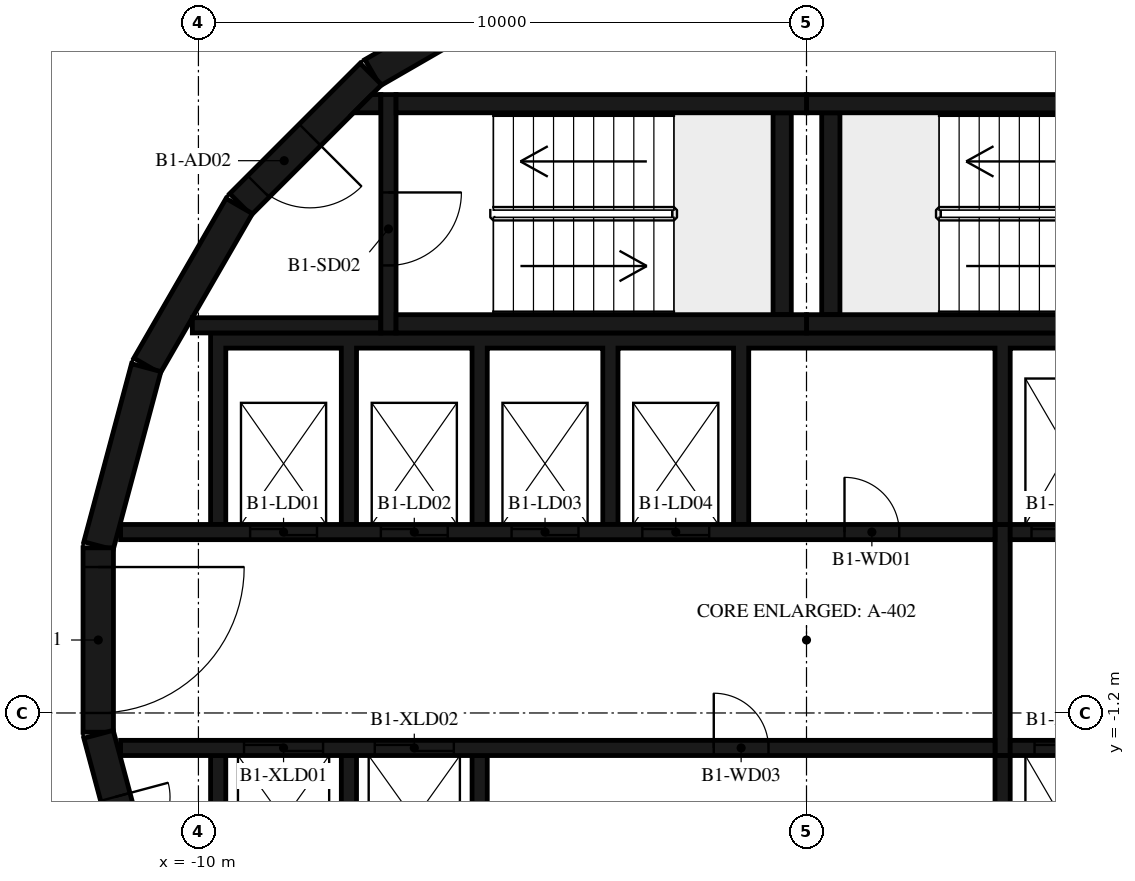
"""IFC4 building model, lengths in metres.
Left out: names, types, materials, properties, quantities, classifications, styles, units other than length and angle.
Written with IfcOpenShell. Run it as: python <this file> out.ifc"""

import sys

from ifc_helpers import new_model, si_unit, direction, frame, frame_2d, origin, place, context, subcontext, project, spatial, polyline, rectangle, outline, extrude, element, fill, save


model = new_model("IFC4")
c1 = context("Model", 3, precision=1e-05, world=origin(), true_north=direction((0.0, 1.0)))
c2 = subcontext(c1, "Body", "Model", "MODEL_VIEW")
j1 = project(units=[si_unit("LENGTHUNIT", "METRE"), si_unit("PLANEANGLEUNIT", "RADIAN")], contexts=[c1])
p1 = place(None, origin())
s1 = spatial("IfcSite", under=j1, at=p1, CompositionType="ELEMENT")
p2 = place(p1, origin())
s2 = spatial("IfcBuilding", under=s1, at=p2, CompositionType="ELEMENT")
p3 = place(p2, frame((0.0, 0.0, -4.2)))
s3 = spatial("IfcBuildingStorey", under=s2, at=p3, CompositionType="ELEMENT", Elevation=-4.2)
p4 = place(p3, frame((-4.51, 10.845, 0.0), z_axis=(0.0, 0.0, 1.0), x_axis=(-0.865975092491, -0.500087131594, 0.0)))
e1 = element("IfcWall", 1, at=p4, inside=s3, PredefinedType="SHEAR", context=c2, shape_type="SweptSolid", body=[
    extrude(rectangle(XDim=3.033, YDim=0.5, at=frame_2d((1.516, 0.0))), origin(), (0.0, 0.0, 1.0), 3.78),
])
p5 = place(p3, frame((-7.164, 9.308, 0.0), z_axis=(0.0, 0.0, 1.0), x_axis=(-0.707106781187, -0.707106781187, 0.0)))
e2 = element("IfcWall", 2, at=p5, inside=s3, PredefinedType="SHEAR", context=c2, shape_type="SweptSolid", body=[
    extrude(rectangle(XDim=3.032, YDim=0.5, at=frame_2d((1.516, 0.0))), origin(), (0.0, 0.0, 1.0), 3.78),
])
p6 = place(p5, frame((1.416, 0.0, 0.0)))
e3 = element("IfcOpeningElement", 3, at=p6, cuts=e2, PredefinedType="OPENING", context=c2, shape_type="SweptSolid", body=[
    extrude(rectangle(XDim=1.2, YDim=2.1, at=frame_2d((0.6, 1.05))), frame((0.0, 0.26, 0.0), z_axis=(0.0, -1.0, 0.0), x_axis=(1.0, 0.0, 0.0)), (0.0, 0.0, 1.0), 0.52),
])
for number, where, z_axis, x_axis in (
    (4, (-9.329, 7.137, 0.0), (0.0, 0.0, 1.0), (-0.5, -0.866, 0.0)),
    (5, (-10.858, 4.479, 0.0), (0.0, 0.0, 1.0), (-0.259, -0.966, 0.0)),
):
    element("IfcWall", number, at=place(p3, frame(where, z_axis=z_axis, x_axis=x_axis)), inside=s3, PredefinedType="SHEAR", context=c2, shape_type="SweptSolid", body=[
        extrude(rectangle(XDim=3.033, YDim=0.5, at=frame_2d((1.516, 0.0))), origin(), (0.0, 0.0, 1.0), 3.78),
    ])
p7 = place(p3, frame((-11.647, 1.516, 0.0), z_axis=(0.0, 0.0, 1.0), x_axis=(0.0, -1.0, 0.0)))
e6 = element("IfcWall", 6, at=p7, inside=s3, PredefinedType="SHEAR", context=c2, shape_type="SweptSolid", body=[
    extrude(rectangle(XDim=3.033, YDim=0.5, at=frame_2d((1.516, 0.0))), origin(), (0.0, 0.0, 1.0), 3.78),
])
p8 = place(p7, frame((0.316, 0.0, 0.0)))
e7 = element("IfcOpeningElement", 7, at=p8, cuts=e6, PredefinedType="OPENING", context=c2, shape_type="SweptSolid", body=[
    extrude(rectangle(XDim=2.4, YDim=2.1, at=frame_2d((1.2, 1.05))), frame((0.0, 0.26, 0.0), z_axis=(0.0, -1.0, 0.0), x_axis=(1.0, 0.0, 0.0)), (0.0, 0.0, 1.0), 0.52),
])
p9 = place(p3, frame((-11.643, -1.55, 0.0), z_axis=(0.0, 0.0, 1.0), x_axis=(0.258734743916, -0.965948410781, 0.0)))
e8 = element("IfcWall", 8, at=p9, inside=s3, PredefinedType="SHEAR", context=c2, shape_type="SweptSolid", body=[
    extrude(rectangle(XDim=3.033, YDim=0.5, at=frame_2d((1.516, 0.0))), origin(), (0.0, 0.0, 1.0), 3.78),
])
p10 = place(p9, frame((1.066, 0.0, 0.0)))
e9 = element("IfcOpeningElement", 9, at=p10, cuts=e8, PredefinedType="OPENING", context=c2, shape_type="SweptSolid", body=[
    extrude(rectangle(XDim=0.9, YDim=2.1, at=frame_2d((0.45, 1.05))), frame((0.0, 0.26, 0.0), z_axis=(0.0, -1.0, 0.0), x_axis=(1.0, 0.0, 0.0)), (0.0, 0.0, 1.0), 0.52),
])
for number, where, z_axis, x_axis in (
    (10, (0.0, 5.2, 0.0), (0.0, 0.0, 1.0), (1.0, 0.0, 0.0)),
    (11, (0.0, 8.82, 0.0), (0.0, 0.0, 1.0), (1.0, 0.0, 0.0)),
):
    element("IfcWall", number, at=place(p3, frame(where, z_axis=z_axis, x_axis=x_axis)), inside=s3, PredefinedType="SHEAR", context=c2, shape_type="SweptSolid", body=[
        extrude(rectangle(XDim=6.75, YDim=0.3, at=frame_2d((3.375, 0.0))), origin(), (0.0, 0.0, 1.0), 3.78),
    ])
p11 = place(p3, frame((0.4, 5.35, 0.0), z_axis=(0.0, 0.0, 1.0), x_axis=(0.0, 1.0, 0.0)))
e12 = element("IfcWall", 12, at=p11, inside=s3, PredefinedType="SHEAR", context=c2, shape_type="SweptSolid", body=[
    extrude(rectangle(XDim=3.32, YDim=0.3, at=frame_2d((1.66, 0.0))), origin(), (0.0, 0.0, 1.0), 3.78),
])
for number, where, z_axis, x_axis in (
    (13, (-6.75, 5.2, 0.0), (0.0, 0.0, 1.0), (1.0, 0.0, 0.0)),
    (14, (-6.75, 8.82, 0.0), (0.0, 0.0, 1.0), (1.0, 0.0, 0.0)),
):
    element("IfcWall", number, at=place(p3, frame(where, z_axis=z_axis, x_axis=x_axis)), inside=s3, PredefinedType="SHEAR", context=c2, shape_type="SweptSolid", body=[
        extrude(rectangle(XDim=6.75, YDim=0.3, at=frame_2d((3.375, 0.0))), origin(), (0.0, 0.0, 1.0), 3.78),
    ])
p12 = place(p3, frame((-0.4, 5.35, 0.0), z_axis=(0.0, 0.0, 1.0), x_axis=(0.0, 1.0, 0.0)))
e15 = element("IfcWall", 15, at=p12, inside=s3, PredefinedType="SHEAR", context=c2, shape_type="SweptSolid", body=[
    extrude(rectangle(XDim=3.32, YDim=0.3, at=frame_2d((1.66, 0.0))), origin(), (0.0, 0.0, 1.0), 3.78),
])
p13 = place(p3, frame((-6.875, 8.97, 0.0), z_axis=(0.0, 0.0, 1.0), x_axis=(0.0, -1.0, 0.0)))
e16 = element("IfcWall", 16, at=p13, inside=s3, PredefinedType="SHEAR", context=c2, shape_type="SweptSolid", body=[
    extrude(rectangle(XDim=3.92, YDim=0.25, at=frame_2d((1.96, 0.0))), origin(), (0.0, 0.0, 1.0), 3.78),
])
p14 = place(p13, frame((1.61, 0.0, 0.0)))
e17 = element("IfcOpeningElement", 17, at=p14, cuts=e16, PredefinedType="OPENING", context=c2, shape_type="SweptSolid", body=[
    extrude(rectangle(XDim=1.2, YDim=2.1, at=frame_2d((0.6, 1.05))), frame((0.0, 0.135, 0.0), z_axis=(0.0, -1.0, 0.0), x_axis=(1.0, 0.0, 0.0)), (0.0, 0.0, 1.0), 0.27),
])
p15 = place(p3, frame((-7.0, 5.175, 0.0), z_axis=(0.0, 0.0, 1.0), x_axis=(-1.0, 0.0, 0.0)))
e18 = element("IfcWall", 18, at=p15, inside=s3, PredefinedType="SHEAR", context=c2, shape_type="SweptSolid", body=[
    extrude(rectangle(XDim=3.1, YDim=0.25, at=frame_2d((1.55, 0.0))), origin(), (0.0, 0.0, 1.0), 3.78),
])
p16 = place(p3, origin())
e19 = element("IfcWall", 19, at=p16, inside=s3, PredefinedType="SHEAR", context=c2, shape_type="SweptSolid", body=[
    extrude(outline(polyline([(-7.148, 8.97), (-7.0, 8.97), (-7.0, 8.67), (-7.448, 8.67), (-7.148, 8.97)])), origin(), (0.0, 0.0, 1.0), 3.78),
])
p17 = place(p3, origin())
e20 = element("IfcWall", 20, at=p17, inside=s3, PredefinedType="SHEAR", context=c2, shape_type="SweptSolid", body=[
    extrude(outline(polyline([(-9.55, 4.8), (-7.65, 4.8), (-7.65, 1.9), (-7.4, 1.9), (-7.4, 4.8), (-5.5, 4.8), (-5.5, 1.9), (-5.25, 1.9), (-5.25, 4.8), (-3.35, 4.8), (-3.35, 1.9), (-3.1, 1.9), (-3.1, 4.8), (-1.2, 4.8), (-1.2, 1.9), (-0.95, 1.9), (-0.95, 4.8), (3.1, 4.8), (3.1, 1.9), (3.35, 1.9), (3.35, 4.8), (5.25, 4.8), (5.25, 1.9), (5.5, 1.9), (5.5, 4.8), (7.4, 4.8), (7.4, 1.9), (7.65, 1.9), (7.65, 4.8), (9.55, 4.8), (9.55, 1.9), (9.8, 1.9), (9.8, 4.8), (9.8, 5.05), (-9.8, 5.05), (-9.8, 4.8), (-9.8, 1.9), (-9.55, 1.9), (-9.55, 4.8)])), origin(), (0.0, 0.0, 1.0), 3.78),
])
p18 = place(p3, origin())
e21 = element("IfcWall", 21, at=p18, inside=s3, PredefinedType="SHEAR", context=c2, shape_type="SweptSolid", body=[
    extrude(outline(polyline([(9.8, -5.05), (9.8, -4.8), (9.8, -1.9), (9.55, -1.9), (9.55, -4.8), (7.65, -4.8), (7.65, -1.9), (7.4, -1.9), (7.4, -4.8), (5.5, -4.8), (5.5, -1.9), (5.25, -1.9), (5.25, -4.8), (3.35, -4.8), (3.35, -1.9), (3.1, -1.9), (3.1, -4.8), (-5.25, -4.8), (-5.25, -1.9), (-5.5, -1.9), (-5.5, -4.8), (-7.4, -4.8), (-7.4, -1.9), (-7.65, -1.9), (-7.65, -4.8), (-9.55, -4.8), (-9.55, -1.9), (-9.8, -1.9), (-9.8, -4.8), (-9.8, -5.05), (9.8, -5.05)])), origin(), (0.0, 0.0, 1.0), 3.78),
])
p19 = place(p3, frame((-11.28, 1.775, 0.0), z_axis=(0.0, 0.0, 1.0), x_axis=(1.0, 0.0, 0.0)))
e22 = element("IfcWall", 22, at=p19, inside=s3, PredefinedType="SHEAR", context=c2, shape_type="SweptSolid", body=[
    extrude(rectangle(XDim=14.38, YDim=0.25, at=frame_2d((7.19, 0.0))), origin(), (0.0, 0.0, 1.0), 3.78),
])
p20 = place(p19, frame((2.13, 0.0, 0.0)))
e23 = element("IfcOpeningElement", 23, at=p20, cuts=e22, PredefinedType="OPENING", context=c2, shape_type="SweptSolid", body=[
    extrude(rectangle(XDim=1.1, YDim=2.1, at=frame_2d((0.55, 1.05))), frame((0.0, 0.135, 0.0), z_axis=(0.0, -1.0, 0.0), x_axis=(1.0, 0.0, 0.0)), (0.0, 0.0, 1.0), 0.27),
])
p21 = place(p19, frame((4.28, 0.0, 0.0)))
e24 = element("IfcOpeningElement", 24, at=p21, cuts=e22, PredefinedType="OPENING", context=c2, shape_type="SweptSolid", body=[
    extrude(rectangle(XDim=1.1, YDim=2.1, at=frame_2d((0.55, 1.05))), frame((0.0, 0.135, 0.0), z_axis=(0.0, -1.0, 0.0), x_axis=(1.0, 0.0, 0.0)), (0.0, 0.0, 1.0), 0.27),
])
p22 = place(p19, frame((6.43, 0.0, 0.0)))
e25 = element("IfcOpeningElement", 25, at=p22, cuts=e22, PredefinedType="OPENING", context=c2, shape_type="SweptSolid", body=[
    extrude(rectangle(XDim=1.1, YDim=2.1, at=frame_2d((0.55, 1.05))), frame((0.0, 0.135, 0.0), z_axis=(0.0, -1.0, 0.0), x_axis=(1.0, 0.0, 0.0)), (0.0, 0.0, 1.0), 0.27),
])
p23 = place(p19, frame((8.58, 0.0, 0.0)))
e26 = element("IfcOpeningElement", 26, at=p23, cuts=e22, PredefinedType="OPENING", context=c2, shape_type="SweptSolid", body=[
    extrude(rectangle(XDim=1.1, YDim=2.1, at=frame_2d((0.55, 1.05))), frame((0.0, 0.135, 0.0), z_axis=(0.0, -1.0, 0.0), x_axis=(1.0, 0.0, 0.0)), (0.0, 0.0, 1.0), 0.27),
])
p24 = place(p19, frame((11.905, 0.0, 0.0)))
e27 = element("IfcOpeningElement", 27, at=p24, cuts=e22, PredefinedType="OPENING", context=c2, shape_type="SweptSolid", body=[
    extrude(rectangle(XDim=0.9, YDim=2.1, at=frame_2d((0.45, 1.05))), frame((0.0, 0.135, 0.0), z_axis=(0.0, -1.0, 0.0), x_axis=(1.0, 0.0, 0.0)), (0.0, 0.0, 1.0), 0.27),
])
p25 = place(p3, frame((3.35, 1.775, 0.0), z_axis=(0.0, 0.0, 1.0), x_axis=(1.0, 0.0, 0.0)))
e28 = element("IfcWall", 28, at=p25, inside=s3, PredefinedType="SHEAR", context=c2, shape_type="SweptSolid", body=[
    extrude(rectangle(XDim=7.93, YDim=0.25, at=frame_2d((3.965, 0.0))), origin(), (0.0, 0.0, 1.0), 3.78),
])
p26 = place(p25, frame((0.35, 0.0, 0.0)))
e29 = element("IfcOpeningElement", 29, at=p26, cuts=e28, PredefinedType="OPENING", context=c2, shape_type="SweptSolid", body=[
    extrude(rectangle(XDim=1.2, YDim=2.4, at=frame_2d((0.6, 1.2))), frame((0.0, 0.135, 0.0), z_axis=(0.0, -1.0, 0.0), x_axis=(1.0, 0.0, 0.0)), (0.0, 0.0, 1.0), 0.27),
])
p27 = place(p25, frame((2.5, 0.0, 0.0)))
e30 = element("IfcOpeningElement", 30, at=p27, cuts=e28, PredefinedType="OPENING", context=c2, shape_type="SweptSolid", body=[
    extrude(rectangle(XDim=1.2, YDim=2.4, at=frame_2d((0.6, 1.2))), frame((0.0, 0.135, 0.0), z_axis=(0.0, -1.0, 0.0), x_axis=(1.0, 0.0, 0.0)), (0.0, 0.0, 1.0), 0.27),
])
p28 = place(p25, frame((4.8, 0.0, 0.0)))
e31 = element("IfcOpeningElement", 31, at=p28, cuts=e28, PredefinedType="OPENING", context=c2, shape_type="SweptSolid", body=[
    extrude(rectangle(XDim=0.9, YDim=2.1, at=frame_2d((0.45, 1.05))), frame((0.0, 0.135, 0.0), z_axis=(0.0, -1.0, 0.0), x_axis=(1.0, 0.0, 0.0)), (0.0, 0.0, 1.0), 0.27),
])
p29 = place(p3, frame((-11.28, -1.775, 0.0), z_axis=(0.0, 0.0, 1.0), x_axis=(1.0, 0.0, 0.0)))
e32 = element("IfcWall", 32, at=p29, inside=s3, PredefinedType="SHEAR", context=c2, shape_type="SweptSolid", body=[
    extrude(rectangle(XDim=14.38, YDim=0.25, at=frame_2d((7.19, 0.0))), origin(), (0.0, 0.0, 1.0), 3.78),
])
p30 = place(p29, frame((2.03, 0.0, 0.0)))
e33 = element("IfcOpeningElement", 33, at=p30, cuts=e32, PredefinedType="OPENING", context=c2, shape_type="SweptSolid", body=[
    extrude(rectangle(XDim=1.3, YDim=2.1, at=frame_2d((0.65, 1.05))), frame((0.0, 0.135, 0.0), z_axis=(0.0, -1.0, 0.0), x_axis=(1.0, 0.0, 0.0)), (0.0, 0.0, 1.0), 0.27),
])
p31 = place(p29, frame((4.18, 0.0, 0.0)))
e34 = element("IfcOpeningElement", 34, at=p31, cuts=e32, PredefinedType="OPENING", context=c2, shape_type="SweptSolid", body=[
    extrude(rectangle(XDim=1.3, YDim=2.1, at=frame_2d((0.65, 1.05))), frame((0.0, 0.135, 0.0), z_axis=(0.0, -1.0, 0.0), x_axis=(1.0, 0.0, 0.0)), (0.0, 0.0, 1.0), 0.27),
])
p32 = place(p29, frame((9.755, 0.0, 0.0)))
e35 = element("IfcOpeningElement", 35, at=p32, cuts=e32, PredefinedType="OPENING", context=c2, shape_type="SweptSolid", body=[
    extrude(rectangle(XDim=0.9, YDim=2.1, at=frame_2d((0.45, 1.05))), frame((0.0, 0.135, 0.0), z_axis=(0.0, -1.0, 0.0), x_axis=(1.0, 0.0, 0.0)), (0.0, 0.0, 1.0), 0.27),
])
p33 = place(p3, frame((3.35, -1.775, 0.0), z_axis=(0.0, 0.0, 1.0), x_axis=(1.0, 0.0, 0.0)))
e36 = element("IfcWall", 36, at=p33, inside=s3, PredefinedType="SHEAR", context=c2, shape_type="SweptSolid", body=[
    extrude(rectangle(XDim=7.93, YDim=0.25, at=frame_2d((3.965, 0.0))), origin(), (0.0, 0.0, 1.0), 3.78),
])
p34 = place(p33, frame((0.4, 0.0, 0.0)))
e37 = element("IfcOpeningElement", 37, at=p34, cuts=e36, PredefinedType="OPENING", context=c2, shape_type="SweptSolid", body=[
    extrude(rectangle(XDim=1.1, YDim=2.4, at=frame_2d((0.55, 1.2))), frame((0.0, 0.135, 0.0), z_axis=(0.0, -1.0, 0.0), x_axis=(1.0, 0.0, 0.0)), (0.0, 0.0, 1.0), 0.27),
])
p35 = place(p33, frame((2.55, 0.0, 0.0)))
e38 = element("IfcOpeningElement", 38, at=p35, cuts=e36, PredefinedType="OPENING", context=c2, shape_type="SweptSolid", body=[
    extrude(rectangle(XDim=1.1, YDim=2.4, at=frame_2d((0.55, 1.2))), frame((0.0, 0.135, 0.0), z_axis=(0.0, -1.0, 0.0), x_axis=(1.0, 0.0, 0.0)), (0.0, 0.0, 1.0), 0.27),
])
p36 = place(p33, frame((4.7, 0.0, 0.0)))
e39 = element("IfcOpeningElement", 39, at=p36, cuts=e36, PredefinedType="OPENING", context=c2, shape_type="SweptSolid", body=[
    extrude(rectangle(XDim=1.1, YDim=2.4, at=frame_2d((0.55, 1.2))), frame((0.0, 0.135, 0.0), z_axis=(0.0, -1.0, 0.0), x_axis=(1.0, 0.0, 0.0)), (0.0, 0.0, 1.0), 0.27),
])
p37 = place(p3, frame((3.225, -1.9, 0.0), z_axis=(0.0, 0.0, 1.0), x_axis=(0.0, 1.0, 0.0)))
e40 = element("IfcWall", 40, at=p37, inside=s3, PredefinedType="SHEAR", context=c2, shape_type="SweptSolid", body=[
    extrude(rectangle(XDim=3.8, YDim=0.25, at=frame_2d((1.9, 0.0))), origin(), (0.0, 0.0, 1.0), 3.78),
])
p38 = place(p14, origin())
e41 = element("IfcDoor", 41, at=p38, inside=s3, OperationType="SINGLE_SWING_LEFT", PredefinedType="DOOR", context=c2, shape_type="SweptSolid", body=[
    extrude(rectangle(XDim=1.2, YDim=2.1, at=frame_2d((0.6, 1.05))), frame((0.0, 0.025, 0.0), z_axis=(0.0, -1.0, 0.0), x_axis=(1.0, 0.0, 0.0)), (0.0, 0.0, 1.0), 0.05),
])
fill(e17, e41)
p39 = place(p6, origin())
e42 = element("IfcDoor", 42, at=p39, inside=s3, OperationType="SINGLE_SWING_RIGHT", PredefinedType="DOOR", context=c2, shape_type="SweptSolid", body=[
    extrude(rectangle(XDim=1.2, YDim=2.1, at=frame_2d((0.6, 1.05))), frame((0.0, 0.025, 0.0), z_axis=(0.0, -1.0, 0.0), x_axis=(1.0, 0.0, 0.0)), (0.0, 0.0, 1.0), 0.05),
])
fill(e3, e42)
p40 = place(p8, origin())
e43 = element("IfcDoor", 43, at=p40, inside=s3, OperationType="DOUBLE_DOOR_SINGLE_SWING", PredefinedType="DOOR", context=c2, shape_type="SweptSolid", body=[
    extrude(rectangle(XDim=2.4, YDim=2.1, at=frame_2d((1.2, 1.05))), frame((0.0, 0.025, 0.0), z_axis=(0.0, -1.0, 0.0), x_axis=(1.0, 0.0, 0.0)), (0.0, 0.0, 1.0), 0.05),
])
fill(e7, e43)
p41 = place(p20, origin())
e44 = element("IfcDoor", 44, at=p41, inside=s3, OperationType="DOUBLE_DOOR_SLIDING", PredefinedType="DOOR", context=c2, shape_type="SweptSolid", body=[
    extrude(rectangle(XDim=1.1, YDim=2.1, at=frame_2d((0.55, 1.05))), frame((0.0, 0.025, 0.0), z_axis=(0.0, -1.0, 0.0), x_axis=(1.0, 0.0, 0.0)), (0.0, 0.0, 1.0), 0.05),
])
fill(e23, e44)
p42 = place(p21, origin())
e45 = element("IfcDoor", 45, at=p42, inside=s3, OperationType="DOUBLE_DOOR_SLIDING", PredefinedType="DOOR", context=c2, shape_type="SweptSolid", body=[
    extrude(rectangle(XDim=1.1, YDim=2.1, at=frame_2d((0.55, 1.05))), frame((0.0, 0.025, 0.0), z_axis=(0.0, -1.0, 0.0), x_axis=(1.0, 0.0, 0.0)), (0.0, 0.0, 1.0), 0.05),
])
fill(e24, e45)
p43 = place(p22, origin())
e46 = element("IfcDoor", 46, at=p43, inside=s3, OperationType="DOUBLE_DOOR_SLIDING", PredefinedType="DOOR", context=c2, shape_type="SweptSolid", body=[
    extrude(rectangle(XDim=1.1, YDim=2.1, at=frame_2d((0.55, 1.05))), frame((0.0, 0.025, 0.0), z_axis=(0.0, -1.0, 0.0), x_axis=(1.0, 0.0, 0.0)), (0.0, 0.0, 1.0), 0.05),
])
fill(e25, e46)
p44 = place(p23, origin())
e47 = element("IfcDoor", 47, at=p44, inside=s3, OperationType="DOUBLE_DOOR_SLIDING", PredefinedType="DOOR", context=c2, shape_type="SweptSolid", body=[
    extrude(rectangle(XDim=1.1, YDim=2.1, at=frame_2d((0.55, 1.05))), frame((0.0, 0.025, 0.0), z_axis=(0.0, -1.0, 0.0), x_axis=(1.0, 0.0, 0.0)), (0.0, 0.0, 1.0), 0.05),
])
fill(e26, e47)
p45 = place(p26, origin())
e48 = element("IfcDoor", 48, at=p45, inside=s3, OperationType="DOUBLE_DOOR_SLIDING", PredefinedType="DOOR", context=c2, shape_type="SweptSolid", body=[
    extrude(rectangle(XDim=1.2, YDim=2.4, at=frame_2d((0.6, 1.2))), frame((0.0, 0.025, 0.0), z_axis=(0.0, -1.0, 0.0), x_axis=(1.0, 0.0, 0.0)), (0.0, 0.0, 1.0), 0.05),
])
fill(e29, e48)
p46 = place(p30, origin())
e49 = element("IfcDoor", 49, at=p46, inside=s3, OperationType="DOUBLE_DOOR_SLIDING", PredefinedType="DOOR", context=c2, shape_type="SweptSolid", body=[
    extrude(rectangle(XDim=1.3, YDim=2.1, at=frame_2d((0.65, 1.05))), frame((0.0, 0.025, 0.0), z_axis=(0.0, -1.0, 0.0), x_axis=(1.0, 0.0, 0.0)), (0.0, 0.0, 1.0), 0.05),
])
fill(e33, e49)
p47 = place(p31, origin())
e50 = element("IfcDoor", 50, at=p47, inside=s3, OperationType="DOUBLE_DOOR_SLIDING", PredefinedType="DOOR", context=c2, shape_type="SweptSolid", body=[
    extrude(rectangle(XDim=1.3, YDim=2.1, at=frame_2d((0.65, 1.05))), frame((0.0, 0.025, 0.0), z_axis=(0.0, -1.0, 0.0), x_axis=(1.0, 0.0, 0.0)), (0.0, 0.0, 1.0), 0.05),
])
fill(e34, e50)
p48 = place(p34, origin())
e51 = element("IfcDoor", 51, at=p48, inside=s3, OperationType="DOUBLE_DOOR_SLIDING", PredefinedType="DOOR", context=c2, shape_type="SweptSolid", body=[
    extrude(rectangle(XDim=1.1, YDim=2.4, at=frame_2d((0.55, 1.2))), frame((0.0, 0.025, 0.0), z_axis=(0.0, -1.0, 0.0), x_axis=(1.0, 0.0, 0.0)), (0.0, 0.0, 1.0), 0.05),
])
fill(e37, e51)
p49 = place(p24, origin())
e52 = element("IfcDoor", 52, at=p49, inside=s3, OperationType="SINGLE_SWING_RIGHT", PredefinedType="DOOR", context=c2, shape_type="SweptSolid", body=[
    extrude(rectangle(XDim=0.9, YDim=2.1, at=frame_2d((0.45, 1.05))), frame((0.0, 0.025, 0.0), z_axis=(0.0, -1.0, 0.0), x_axis=(1.0, 0.0, 0.0)), (0.0, 0.0, 1.0), 0.05),
])
fill(e27, e52)
p50 = place(p32, origin())
e53 = element("IfcDoor", 53, at=p50, inside=s3, OperationType="SINGLE_SWING_RIGHT", PredefinedType="DOOR", context=c2, shape_type="SweptSolid", body=[
    extrude(rectangle(XDim=0.9, YDim=2.1, at=frame_2d((0.45, 1.05))), frame((0.0, 0.025, 0.0), z_axis=(0.0, -1.0, 0.0), x_axis=(1.0, 0.0, 0.0)), (0.0, 0.0, 1.0), 0.05),
])
fill(e35, e53)
p51 = place(p10, origin())
e54 = element("IfcDoor", 54, at=p51, inside=s3, OperationType="SINGLE_SWING_LEFT", PredefinedType="DOOR", context=c2, shape_type="SweptSolid", body=[
    extrude(rectangle(XDim=0.9, YDim=2.1, at=frame_2d((0.45, 1.05))), frame((0.0, 0.025, 0.0), z_axis=(0.0, -1.0, 0.0), x_axis=(1.0, 0.0, 0.0)), (0.0, 0.0, 1.0), 0.05),
])
fill(e9, e54)
save(model, sys.argv[1])
